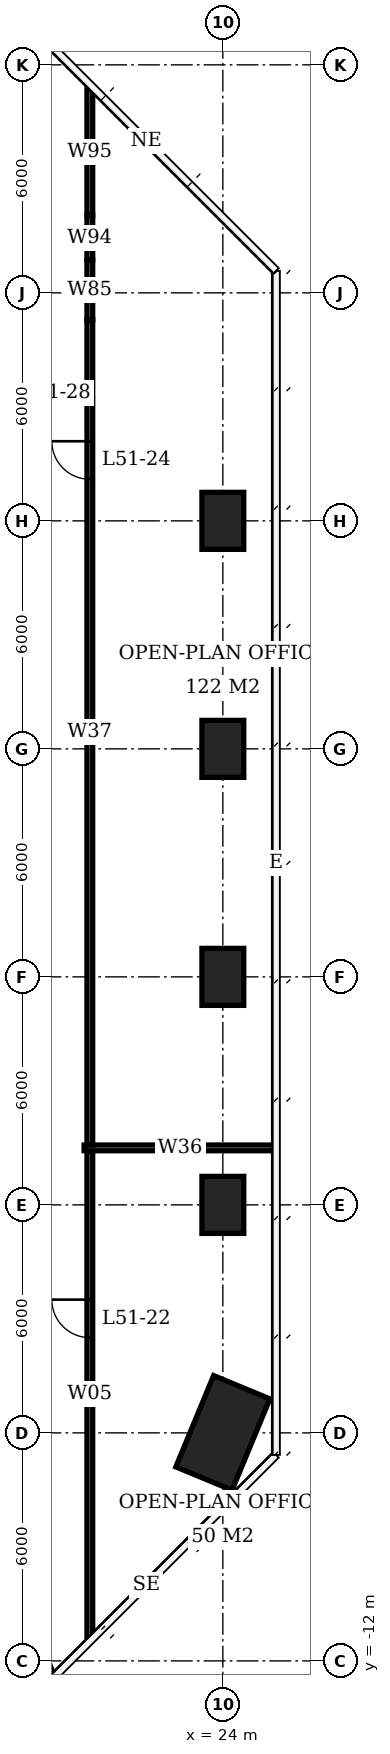
"""IFC4 building model, lengths in metres.
Left out: names, types, materials, properties, quantities, classifications, styles, units other than length and angle.
Written with IfcOpenShell. Run it as: python <this file> out.ifc"""

import sys

from ifc_helpers import new_model, si_unit, direction, frame, frame_2d, origin, origin_2d, place, context, subcontext, project, spatial, rectangle, extrude, element, fill, save


model = new_model("IFC4")
c1 = context("Model", 3, precision=1e-05, world=origin(), true_north=direction((0.0, 1.0)))
c2 = subcontext(c1, "Body", "Model", "MODEL_VIEW")
j1 = project(units=[si_unit("LENGTHUNIT", "METRE"), si_unit("PLANEANGLEUNIT", "RADIAN")], contexts=[c1])
p1 = place(None, origin())
s1 = spatial("IfcSite", under=j1, at=p1, CompositionType="ELEMENT")
p2 = place(p1, origin())
s2 = spatial("IfcBuilding", under=s1, at=p2, CompositionType="ELEMENT")
p3 = place(p2, frame((0.0, 0.0, 208.4)))
s3 = spatial("IfcBuildingStorey", under=s2, at=p3, CompositionType="ELEMENT", Elevation=208.4)
for number, where, z_axis, x_axis in (
    (1, (18.0, -12.0, 0.0), (0.0, 0.0, 1.0), (-0.924, -0.383, 0.0)),
    (2, (24.0, -6.0, 0.0), (0.0, 0.0, 1.0), (-0.383, -0.924, 0.0)),
):
    element("IfcColumn", number, at=place(p3, frame(where, z_axis=z_axis, x_axis=x_axis)), inside=s3, PredefinedType="COLUMN", context=c2, shape_type="SweptSolid", body=[
        extrude(rectangle(XDim=2.6, YDim=1.6, at=origin_2d()), origin(), (0.0, 0.0, 1.0), 3.9),
    ])
for number, where, z_axis, x_axis in (
    (3, (24.0, 0.0, 0.0), (0.0, 0.0, 1.0), (0.0, 1.0, 0.0)),
    (4, (24.0, 6.0, 0.0), (0.0, 0.0, 1.0), (0.0, 1.0, 0.0)),
    (5, (24.0, 12.0, 0.0), (0.0, 0.0, 1.0), (0.0, 1.0, 0.0)),
    (6, (24.0, 18.0, 0.0), (0.0, 0.0, 1.0), (0.0, 1.0, 0.0)),
):
    element("IfcColumn", number, at=place(p3, frame(where, z_axis=z_axis, x_axis=x_axis)), inside=s3, PredefinedType="COLUMN", context=c2, shape_type="SweptSolid", body=[
        extrude(rectangle(XDim=1.5, YDim=1.1, at=origin_2d()), origin(), (0.0, 0.0, 1.0), 3.9),
    ])
p4 = place(p3, frame((20.5, -11.39, 0.0), z_axis=(0.0, 0.0, 1.0), x_axis=(0.0, 1.0, 0.0)))
e7 = element("IfcWall", 7, at=p4, inside=s3, PredefinedType="PARTITIONING", context=c2, shape_type="SweptSolid", body=[
    extrude(rectangle(XDim=12.815, YDim=0.15, at=frame_2d((6.407, 0.0))), origin(), (0.0, 0.0, 1.0), 3.65),
])
p5 = place(p4, frame((7.897, 0.0, 0.0)))
e8 = element("IfcOpeningElement", 8, at=p5, cuts=e7, PredefinedType="OPENING", context=c2, shape_type="SweptSolid", body=[
    extrude(rectangle(XDim=1.0, YDim=2.1, at=frame_2d((0.5, 1.05))), frame((0.0, 0.085, 0.0), z_axis=(0.0, -1.0, 0.0), x_axis=(1.0, 0.0, 0.0)), (0.0, 0.0, 1.0), 0.17),
])
p6 = place(p3, frame((20.5, 1.575, 0.0), z_axis=(0.0, 0.0, 1.0), x_axis=(0.0, 1.0, 0.0)))
e9 = element("IfcWall", 9, at=p6, inside=s3, PredefinedType="PARTITIONING", context=c2, shape_type="SweptSolid", body=[
    extrude(rectangle(XDim=21.715, YDim=0.15, at=frame_2d((10.857, 0.0))), origin(), (0.0, 0.0, 1.0), 3.65),
])
p7 = place(p6, frame((17.52, 0.0, 0.0)))
e10 = element("IfcOpeningElement", 10, at=p7, cuts=e9, PredefinedType="OPENING", context=c2, shape_type="SweptSolid", body=[
    extrude(rectangle(XDim=1.0, YDim=2.1, at=frame_2d((0.5, 1.05))), frame((0.0, 0.085, 0.0), z_axis=(0.0, -1.0, 0.0), x_axis=(1.0, 0.0, 0.0)), (0.0, 0.0, 1.0), 0.17),
])
p8 = place(p3, frame((20.5, 23.29, 0.0), z_axis=(0.0, 0.0, 1.0), x_axis=(0.0, 1.0, 0.0)))
e11 = element("IfcWall", 11, at=p8, inside=s3, PredefinedType="PARTITIONING", context=c2, shape_type="SweptSolid", body=[
    extrude(rectangle(XDim=1.57, YDim=0.15, at=frame_2d((0.785, 0.0))), origin(), (0.0, 0.0, 1.0), 2.65),
])
p9 = place(p3, frame((20.5, 24.86, 0.0), z_axis=(0.0, 0.0, 1.0), x_axis=(0.0, 1.0, 0.0)))
e12 = element("IfcWall", 12, at=p9, inside=s3, PredefinedType="PARTITIONING", context=c2, shape_type="SweptSolid", body=[
    extrude(rectangle(XDim=1.18, YDim=0.15, at=frame_2d((0.59, 0.0))), origin(), (0.0, 0.0, 1.0), 2.65),
])
p10 = place(p3, frame((20.5, 26.04, 0.0), z_axis=(0.0, 0.0, 1.0), x_axis=(0.0, 1.0, 0.0)))
e13 = element("IfcWall", 13, at=p10, inside=s3, PredefinedType="PARTITIONING", context=c2, shape_type="SweptSolid", body=[
    extrude(rectangle(XDim=3.348, YDim=0.15, at=frame_2d((1.674, 0.0))), origin(), (0.0, 0.0, 1.0), 3.65),
])
p11 = place(p3, frame((20.35, 1.5, 0.0), z_axis=(0.0, 0.0, 1.0), x_axis=(1.0, 0.0, 0.0)))
e14 = element("IfcWall", 14, at=p11, inside=s3, PredefinedType="PARTITIONING", context=c2, shape_type="SweptSolid", body=[
    extrude(rectangle(XDim=5.05, YDim=0.15, at=frame_2d((2.525, 0.0))), origin(), (0.0, 0.0, 1.0), 3.65),
])
p12 = place(p5, origin())
e15 = element("IfcDoor", 15, at=p12, inside=s3, OperationType="SINGLE_SWING_RIGHT", PredefinedType="DOOR", context=c2, shape_type="SweptSolid", body=[
    extrude(rectangle(XDim=1.0, YDim=2.1, at=frame_2d((0.5, 1.05))), frame((0.0, 0.025, 0.0), z_axis=(0.0, -1.0, 0.0), x_axis=(1.0, 0.0, 0.0)), (0.0, 0.0, 1.0), 0.05),
])
fill(e8, e15)
p13 = place(p7, origin())
e16 = element("IfcDoor", 16, at=p13, inside=s3, OperationType="SINGLE_SWING_RIGHT", PredefinedType="DOOR", context=c2, shape_type="SweptSolid", body=[
    extrude(rectangle(XDim=1.0, YDim=2.1, at=frame_2d((0.5, 1.05))), frame((0.0, 0.025, 0.0), z_axis=(0.0, -1.0, 0.0), x_axis=(1.0, 0.0, 0.0)), (0.0, 0.0, 1.0), 0.05),
])
fill(e10, e16)
save(model, sys.argv[1])
